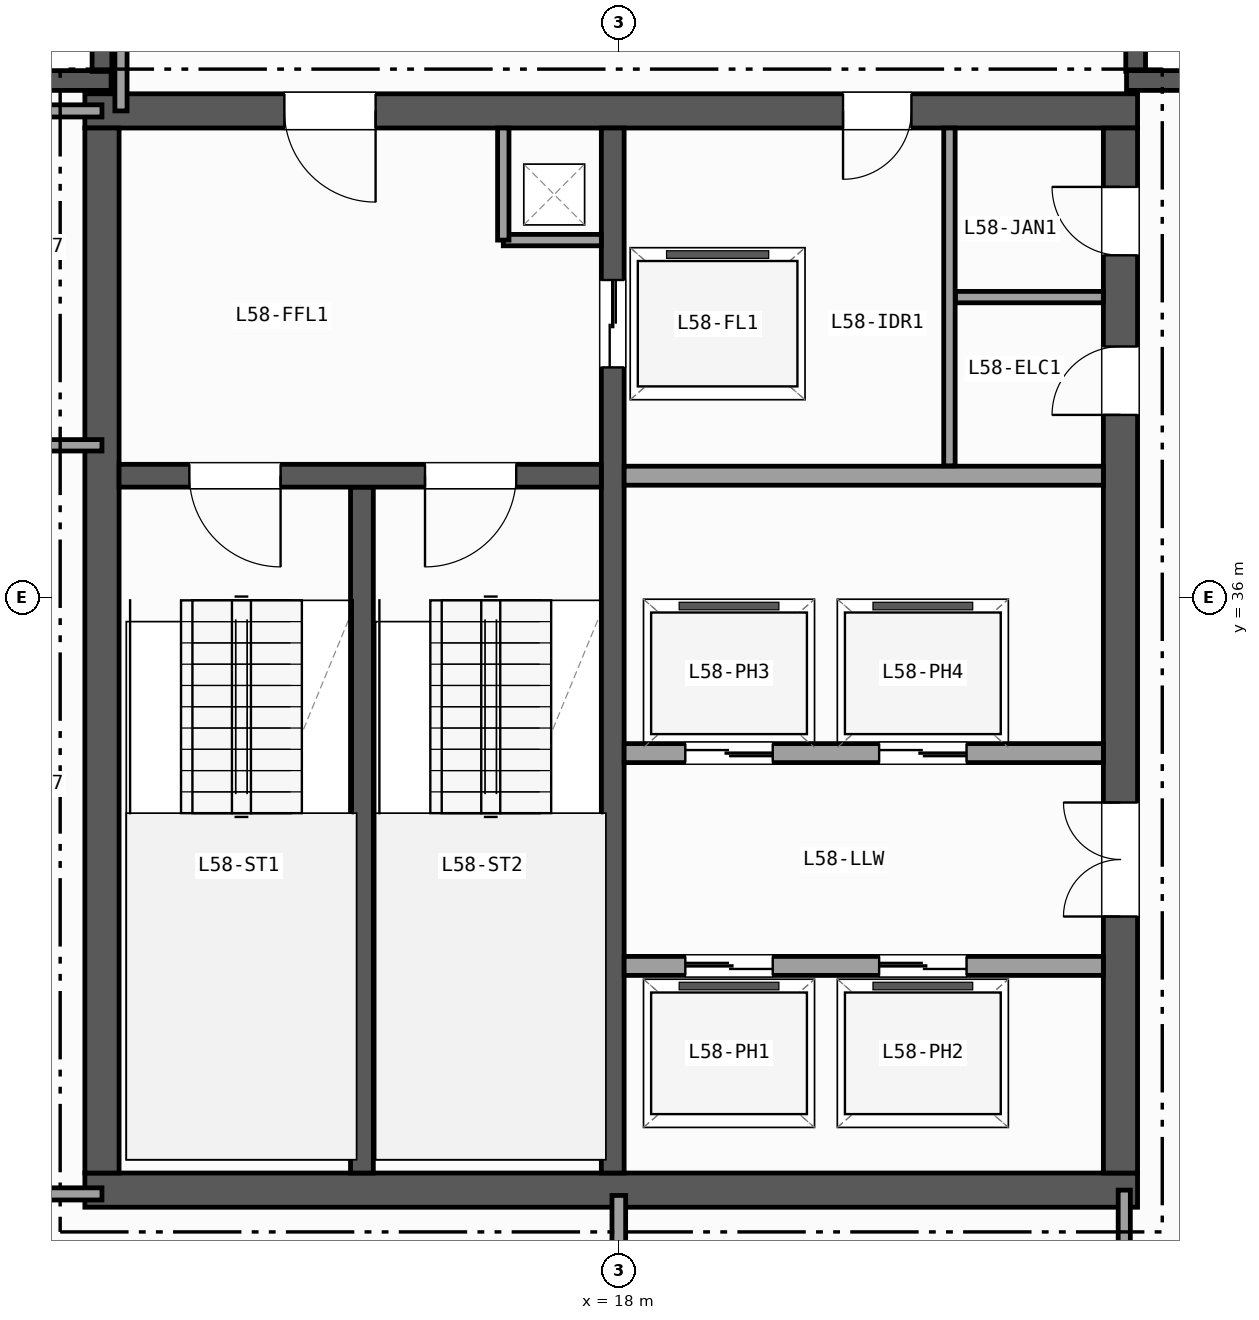
"""IFC4 building model, lengths in metres.
Left out: names, types, materials, properties, quantities, classifications, styles, units other than length and angle.
Written with IfcOpenShell. Run it as: python <this file> out.ifc"""

import sys

from ifc_helpers import new_model, si_unit, direction, frame, frame_2d, origin, place, context, subcontext, project, spatial, rectangle, extrude, element, fill, save


model = new_model("IFC4")
c1 = context("Model", 3, precision=1e-05, world=origin(), true_north=direction((0.0, 1.0)))
c2 = subcontext(c1, "Body", "Model", "MODEL_VIEW")
j1 = project(units=[si_unit("LENGTHUNIT", "METRE"), si_unit("PLANEANGLEUNIT", "RADIAN")], contexts=[c1])
p1 = place(None, origin())
s1 = spatial("IfcSite", under=j1, at=p1, CompositionType="ELEMENT")
p2 = place(p1, origin())
s2 = spatial("IfcBuilding", under=s1, at=p2, CompositionType="ELEMENT")
p3 = place(p2, frame((0.0, 0.0, 232.1)))
s3 = spatial("IfcBuildingStorey", under=s2, at=p3, CompositionType="ELEMENT", Elevation=232.1)
p4 = place(p3, frame((9.0, 42.8, 0.0), z_axis=(0.0, 0.0, 1.0), x_axis=(1.0, 0.0, 0.0)))
e1 = element("IfcWall", 1, at=p4, inside=s3, PredefinedType="SOLIDWALL", context=c2, shape_type="SweptSolid", body=[
    extrude(rectangle(XDim=2.32, YDim=0.26, at=frame_2d((1.16, 0.0))), origin(), (0.0, 0.0, 1.0), 3.37),
])
for number, where, z_axis, x_axis in (
    (2, (11.2, 42.92, 0.0), (0.0, 0.0, 1.0), (0.0, 1.0, 0.0)),
    (3, (24.8, 45.0, 0.0), (0.0, 0.0, 1.0), (0.0, -1.0, 0.0)),
):
    element("IfcWall", number, at=place(p3, frame(where, z_axis=z_axis, x_axis=x_axis)), inside=s3, PredefinedType="SOLIDWALL", context=c2, shape_type="SweptSolid", body=[
        extrude(rectangle(XDim=2.08, YDim=0.26, at=frame_2d((1.04, 0.0))), origin(), (0.0, 0.0, 1.0), 3.37),
    ])
p5 = place(p3, frame((24.68, 42.8, 0.0), z_axis=(0.0, 0.0, 1.0), x_axis=(1.0, 0.0, 0.0)))
e4 = element("IfcWall", 4, at=p5, inside=s3, PredefinedType="SOLIDWALL", context=c2, shape_type="SweptSolid", body=[
    extrude(rectangle(XDim=2.32, YDim=0.26, at=frame_2d((1.16, 0.0))), origin(), (0.0, 0.0, 1.0), 3.37),
])
p6 = place(p3, frame((10.975, 28.2, 0.0), z_axis=(0.0, 0.0, 1.0), x_axis=(1.0, 0.0, 0.0)))
e5 = element("IfcWall", 5, at=p6, inside=s3, PredefinedType="SHEAR", context=c2, shape_type="SweptSolid", body=[
    extrude(rectangle(XDim=13.85, YDim=0.45, at=frame_2d((6.925, 0.0))), origin(), (0.0, 0.0, 1.0), 3.37),
])
p7 = place(p3, frame((24.825, 42.4, 0.0), z_axis=(0.0, 0.0, 1.0), x_axis=(-1.0, 0.0, 0.0)))
e6 = element("IfcWall", 6, at=p7, inside=s3, PredefinedType="SHEAR", context=c2, shape_type="SweptSolid", body=[
    extrude(rectangle(XDim=13.85, YDim=0.45, at=frame_2d((6.925, 0.0))), origin(), (0.0, 0.0, 1.0), 3.37),
])
p8 = place(p7, frame((10.025, 0.0, 0.0)))
e7 = element("IfcOpeningElement", 7, at=p8, cuts=e6, PredefinedType="OPENING", context=c2, shape_type="SweptSolid", body=[
    extrude(rectangle(XDim=1.2, YDim=2.15, at=frame_2d((0.6, 1.075))), frame((0.0, 0.235, 0.0), z_axis=(0.0, -1.0, 0.0), x_axis=(1.0, 0.0, 0.0)), (0.0, 0.0, 1.0), 0.47),
])
p9 = place(p7, frame((2.975, 0.0, 0.0)))
e8 = element("IfcOpeningElement", 8, at=p9, cuts=e6, PredefinedType="OPENING", context=c2, shape_type="SweptSolid", body=[
    extrude(rectangle(XDim=0.9, YDim=2.1, at=frame_2d((0.45, 1.05))), frame((0.0, 0.235, 0.0), z_axis=(0.0, -1.0, 0.0), x_axis=(1.0, 0.0, 0.0)), (0.0, 0.0, 1.0), 0.47),
])
p10 = place(p3, frame((11.2, 42.175, 0.0), z_axis=(0.0, 0.0, 1.0), x_axis=(0.0, -1.0, 0.0)))
e9 = element("IfcWall", 9, at=p10, inside=s3, PredefinedType="SHEAR", context=c2, shape_type="SweptSolid", body=[
    extrude(rectangle(XDim=13.75, YDim=0.45, at=frame_2d((6.875, 0.0))), origin(), (0.0, 0.0, 1.0), 3.37),
])
p11 = place(p3, frame((24.6, 28.425, 0.0), z_axis=(0.0, 0.0, 1.0), x_axis=(0.0, 1.0, 0.0)))
e10 = element("IfcWall", 10, at=p11, inside=s3, PredefinedType="SHEAR", context=c2, shape_type="SweptSolid", body=[
    extrude(rectangle(XDim=13.75, YDim=0.45, at=frame_2d((6.875, 0.0))), origin(), (0.0, 0.0, 1.0), 3.37),
])
p12 = place(p11, frame((3.375, 0.0, 0.0)))
e11 = element("IfcOpeningElement", 11, at=p12, cuts=e10, PredefinedType="OPENING", context=c2, shape_type="SweptSolid", body=[
    extrude(rectangle(XDim=1.5, YDim=2.2, at=frame_2d((0.75, 1.1))), frame((0.0, 0.235, 0.0), z_axis=(0.0, -1.0, 0.0), x_axis=(1.0, 0.0, 0.0)), (0.0, 0.0, 1.0), 0.47),
])
p13 = place(p11, frame((9.975, 0.0, 0.0)))
e12 = element("IfcOpeningElement", 12, at=p13, cuts=e10, PredefinedType="OPENING", context=c2, shape_type="SweptSolid", body=[
    extrude(rectangle(XDim=0.9, YDim=2.1, at=frame_2d((0.45, 1.05))), frame((0.0, 0.235, 0.0), z_axis=(0.0, -1.0, 0.0), x_axis=(1.0, 0.0, 0.0)), (0.0, 0.0, 1.0), 0.47),
])
p14 = place(p11, frame((12.075, 0.0, 0.0)))
e13 = element("IfcOpeningElement", 13, at=p14, cuts=e10, PredefinedType="OPENING", context=c2, shape_type="SweptSolid", body=[
    extrude(rectangle(XDim=0.9, YDim=2.1, at=frame_2d((0.45, 1.05))), frame((0.0, 0.235, 0.0), z_axis=(0.0, -1.0, 0.0), x_axis=(1.0, 0.0, 0.0)), (0.0, 0.0, 1.0), 0.47),
])
p15 = place(p3, frame((14.62, 28.425, 0.0), z_axis=(0.0, 0.0, 1.0), x_axis=(0.0, 1.0, 0.0)))
e14 = element("IfcWall", 14, at=p15, inside=s3, PredefinedType="SHEAR", context=c2, shape_type="SweptSolid", body=[
    extrude(rectangle(XDim=9.025, YDim=0.3, at=frame_2d((4.512, 0.0))), origin(), (0.0, 0.0, 1.0), 3.37),
])
p16 = place(p3, frame((17.92, 42.175, 0.0), z_axis=(0.0, 0.0, 1.0), x_axis=(0.0, -1.0, 0.0)))
e15 = element("IfcWall", 15, at=p16, inside=s3, PredefinedType="SHEAR", context=c2, shape_type="SweptSolid", body=[
    extrude(rectangle(XDim=13.75, YDim=0.3, at=frame_2d((6.875, 0.0))), origin(), (0.0, 0.0, 1.0), 3.37),
])
p17 = place(p16, frame((2.0, 0.0, 0.0)))
e16 = element("IfcOpeningElement", 16, at=p17, cuts=e15, PredefinedType="OPENING", context=c2, shape_type="SweptSolid", body=[
    extrude(rectangle(XDim=1.15, YDim=2.15, at=frame_2d((0.575, 1.075))), frame((0.0, 0.16, 0.0), z_axis=(0.0, -1.0, 0.0), x_axis=(1.0, 0.0, 0.0)), (0.0, 0.0, 1.0), 0.32),
])
p18 = place(p3, frame((17.77, 37.6, 0.0), z_axis=(0.0, 0.0, 1.0), x_axis=(-1.0, 0.0, 0.0)))
e17 = element("IfcWall", 17, at=p18, inside=s3, PredefinedType="SHEAR", context=c2, shape_type="SweptSolid", body=[
    extrude(rectangle(XDim=6.345, YDim=0.3, at=frame_2d((3.172, 0.0))), origin(), (0.0, 0.0, 1.0), 3.37),
])
p19 = place(p18, frame((4.22, 0.0, 0.0)))
e18 = element("IfcOpeningElement", 18, at=p19, cuts=e17, PredefinedType="OPENING", context=c2, shape_type="SweptSolid", body=[
    extrude(rectangle(XDim=1.2, YDim=2.15, at=frame_2d((0.6, 1.075))), frame((0.0, 0.16, 0.0), z_axis=(0.0, -1.0, 0.0), x_axis=(1.0, 0.0, 0.0)), (0.0, 0.0, 1.0), 0.32),
])
p20 = place(p18, frame((1.12, 0.0, 0.0)))
e19 = element("IfcOpeningElement", 19, at=p20, cuts=e17, PredefinedType="OPENING", context=c2, shape_type="SweptSolid", body=[
    extrude(rectangle(XDim=1.2, YDim=2.15, at=frame_2d((0.6, 1.075))), frame((0.0, 0.16, 0.0), z_axis=(0.0, -1.0, 0.0), x_axis=(1.0, 0.0, 0.0)), (0.0, 0.0, 1.0), 0.32),
])
p21 = place(p3, frame((16.48, 40.7, 0.0), z_axis=(0.0, 0.0, 1.0), x_axis=(1.0, 0.0, 0.0)))
e20 = element("IfcWall", 20, at=p21, inside=s3, PredefinedType="PARTITIONING", context=c2, shape_type="SweptSolid", body=[
    extrude(rectangle(XDim=1.29, YDim=0.15, at=frame_2d((0.645, 0.0))), origin(), (0.0, 0.0, 1.0), 3.37),
])
p22 = place(p3, frame((16.48, 40.7, 0.0), z_axis=(0.0, 0.0, 1.0), x_axis=(0.0, 1.0, 0.0)))
e21 = element("IfcWall", 21, at=p22, inside=s3, PredefinedType="PARTITIONING", context=c2, shape_type="SweptSolid", body=[
    extrude(rectangle(XDim=1.475, YDim=0.15, at=frame_2d((0.738, 0.0))), origin(), (0.0, 0.0, 1.0), 3.37),
])
p23 = place(p3, frame((18.07, 37.6, 0.0), z_axis=(0.0, 0.0, 1.0), x_axis=(1.0, 0.0, 0.0)))
e22 = element("IfcWall", 22, at=p23, inside=s3, PredefinedType="PARTITIONING", context=c2, shape_type="SweptSolid", body=[
    extrude(rectangle(XDim=6.305, YDim=0.25, at=frame_2d((3.152, 0.0))), origin(), (0.0, 0.0, 1.0), 3.37),
])
p24 = place(p3, frame((18.07, 31.15, 0.0), z_axis=(0.0, 0.0, 1.0), x_axis=(1.0, 0.0, 0.0)))
e23 = element("IfcWall", 23, at=p24, inside=s3, PredefinedType="PARTITIONING", context=c2, shape_type="SweptSolid", body=[
    extrude(rectangle(XDim=6.305, YDim=0.25, at=frame_2d((3.152, 0.0))), origin(), (0.0, 0.0, 1.0), 3.37),
])
p25 = place(p24, frame((0.805, 0.0, 0.0)))
e24 = element("IfcOpeningElement", 24, at=p25, cuts=e23, PredefinedType="OPENING", context=c2, shape_type="SweptSolid", body=[
    extrude(rectangle(XDim=1.15, YDim=2.15, at=frame_2d((0.575, 1.075))), frame((0.0, 0.135, 0.0), z_axis=(0.0, -1.0, 0.0), x_axis=(1.0, 0.0, 0.0)), (0.0, 0.0, 1.0), 0.27),
])
p26 = place(p24, frame((3.355, 0.0, 0.0)))
e25 = element("IfcOpeningElement", 25, at=p26, cuts=e23, PredefinedType="OPENING", context=c2, shape_type="SweptSolid", body=[
    extrude(rectangle(XDim=1.15, YDim=2.15, at=frame_2d((0.575, 1.075))), frame((0.0, 0.135, 0.0), z_axis=(0.0, -1.0, 0.0), x_axis=(1.0, 0.0, 0.0)), (0.0, 0.0, 1.0), 0.27),
])
p27 = place(p3, frame((24.375, 33.95, 0.0), z_axis=(0.0, 0.0, 1.0), x_axis=(-1.0, 0.0, 0.0)))
e26 = element("IfcWall", 26, at=p27, inside=s3, PredefinedType="PARTITIONING", context=c2, shape_type="SweptSolid", body=[
    extrude(rectangle(XDim=6.305, YDim=0.25, at=frame_2d((3.152, 0.0))), origin(), (0.0, 0.0, 1.0), 3.37),
])
p28 = place(p27, frame((4.35, 0.0, 0.0)))
e27 = element("IfcOpeningElement", 27, at=p28, cuts=e26, PredefinedType="OPENING", context=c2, shape_type="SweptSolid", body=[
    extrude(rectangle(XDim=1.15, YDim=2.15, at=frame_2d((0.575, 1.075))), frame((0.0, 0.135, 0.0), z_axis=(0.0, -1.0, 0.0), x_axis=(1.0, 0.0, 0.0)), (0.0, 0.0, 1.0), 0.27),
])
p29 = place(p27, frame((1.8, 0.0, 0.0)))
e28 = element("IfcOpeningElement", 28, at=p29, cuts=e26, PredefinedType="OPENING", context=c2, shape_type="SweptSolid", body=[
    extrude(rectangle(XDim=1.15, YDim=2.15, at=frame_2d((0.575, 1.075))), frame((0.0, 0.135, 0.0), z_axis=(0.0, -1.0, 0.0), x_axis=(1.0, 0.0, 0.0)), (0.0, 0.0, 1.0), 0.27),
])
p30 = place(p3, frame((22.35, 37.73, 0.0), z_axis=(0.0, 0.0, 1.0), x_axis=(0.0, 1.0, 0.0)))
e29 = element("IfcWall", 29, at=p30, inside=s3, PredefinedType="PARTITIONING", context=c2, shape_type="SweptSolid", body=[
    extrude(rectangle(XDim=4.445, YDim=0.15, at=frame_2d((2.223, 0.0))), origin(), (0.0, 0.0, 1.0), 3.37),
])
p31 = place(p3, frame((22.43, 39.95, 0.0), z_axis=(0.0, 0.0, 1.0), x_axis=(1.0, 0.0, 0.0)))
e30 = element("IfcWall", 30, at=p31, inside=s3, PredefinedType="PARTITIONING", context=c2, shape_type="SweptSolid", body=[
    extrude(rectangle(XDim=1.945, YDim=0.15, at=frame_2d((0.973, 0.0))), origin(), (0.0, 0.0, 1.0), 3.37),
])
p32 = place(p3, frame((9.0, 28.15, 0.0), z_axis=(0.0, 0.0, 1.0), x_axis=(1.0, 0.0, 0.0)))
e31 = element("IfcWall", 31, at=p32, inside=s3, PredefinedType="PARTITIONING", context=c2, shape_type="SweptSolid", body=[
    extrude(rectangle(XDim=2.2, YDim=0.16, at=frame_2d((1.1, 0.0))), origin(), (0.0, 0.0, 1.0), 2.657),
])
p33 = place(p32, frame((0.45, 0.0, 0.0)))
e32 = element("IfcOpeningElement", 32, at=p33, cuts=e31, PredefinedType="OPENING", context=c2, shape_type="SweptSolid", body=[
    extrude(rectangle(XDim=1.0, YDim=2.1, at=frame_2d((0.5, 1.05))), frame((0.0, 0.09, 0.0), z_axis=(0.0, -1.0, 0.0), x_axis=(1.0, 0.0, 0.0)), (0.0, 0.0, 1.0), 0.18),
])
p34 = place(p3, frame((9.0, 42.4, 0.0), z_axis=(0.0, 0.0, 1.0), x_axis=(1.0, 0.0, 0.0)))
e33 = element("IfcWall", 33, at=p34, inside=s3, PredefinedType="PARTITIONING", context=c2, shape_type="SweptSolid", body=[
    extrude(rectangle(XDim=2.2, YDim=0.16, at=frame_2d((1.1, 0.0))), origin(), (0.0, 0.0, 1.0), 3.37),
])
p35 = place(p3, frame((11.45, 42.4, 0.0), z_axis=(0.0, 0.0, 1.0), x_axis=(0.0, 1.0, 0.0)))
e34 = element("IfcWall", 34, at=p35, inside=s3, PredefinedType="PARTITIONING", context=c2, shape_type="SweptSolid", body=[
    extrude(rectangle(XDim=2.666, YDim=0.16, at=frame_2d((1.333, 0.0))), origin(), (0.0, 0.0, 1.0), 3.37),
])
p36 = place(p3, frame((9.0, 38.0, 0.0), z_axis=(0.0, 0.0, 1.0), x_axis=(1.0, 0.0, 0.0)))
e35 = element("IfcWall", 35, at=p36, inside=s3, PredefinedType="PARTITIONING", context=c2, shape_type="SweptSolid", body=[
    extrude(rectangle(XDim=2.2, YDim=0.15, at=frame_2d((1.1, 0.0))), origin(), (0.0, 0.0, 1.0), 3.37),
])
p37 = place(p36, frame((0.45, 0.0, 0.0)))
e36 = element("IfcOpeningElement", 36, at=p37, cuts=e35, PredefinedType="OPENING", context=c2, shape_type="SweptSolid", body=[
    extrude(rectangle(XDim=0.9, YDim=2.1, at=frame_2d((0.45, 1.05))), frame((0.0, 0.085, 0.0), z_axis=(0.0, -1.0, 0.0), x_axis=(1.0, 0.0, 0.0)), (0.0, 0.0, 1.0), 0.17),
])
p38 = place(p3, frame((24.65, 9.0, 0.0), z_axis=(0.0, 0.0, 1.0), x_axis=(0.0, 1.0, 0.0)))
e37 = element("IfcWall", 37, at=p38, inside=s3, PredefinedType="PARTITIONING", context=c2, shape_type="SweptSolid", body=[
    extrude(rectangle(XDim=19.2, YDim=0.16, at=frame_2d((9.6, 0.0))), origin(), (0.0, 0.0, 1.0), 2.657),
])
p39 = place(p38, frame((3.2, 0.0, 0.0)))
e38 = element("IfcOpeningElement", 38, at=p39, cuts=e37, PredefinedType="OPENING", context=c2, shape_type="SweptSolid", body=[
    extrude(rectangle(XDim=1.2, YDim=2.15, at=frame_2d((0.6, 1.075))), frame((0.0, 0.09, 0.0), z_axis=(0.0, -1.0, 0.0), x_axis=(1.0, 0.0, 0.0)), (0.0, 0.0, 1.0), 0.18),
])
p40 = place(p38, frame((12.765, 0.0, 0.0)))
e39 = element("IfcOpeningElement", 39, at=p40, cuts=e37, PredefinedType="OPENING", context=c2, shape_type="SweptSolid", body=[
    extrude(rectangle(XDim=0.86, YDim=2.05, at=frame_2d((0.43, 1.025))), frame((0.0, 0.09, 0.0), z_axis=(0.0, -1.0, 0.0), x_axis=(1.0, 0.0, 0.0)), (0.0, 0.0, 1.0), 0.18),
])
p41 = place(p3, frame((18.0, 9.0, 0.0), z_axis=(0.0, 0.0, 1.0), x_axis=(0.0, 1.0, 0.0)))
e40 = element("IfcWall", 40, at=p41, inside=s3, PredefinedType="PARTITIONING", context=c2, shape_type="SweptSolid", body=[
    extrude(rectangle(XDim=19.13, YDim=0.18, at=frame_2d((9.565, 0.0))), origin(), (0.0, 0.0, 1.0), 2.657),
])
p42 = place(p41, frame((2.2, 0.0, 0.0)))
e41 = element("IfcOpeningElement", 41, at=p42, cuts=e40, PredefinedType="OPENING", context=c2, shape_type="SweptSolid", body=[
    extrude(rectangle(XDim=0.95, YDim=2.1, at=frame_2d((0.475, 1.05))), frame((0.0, 0.1, 0.0), z_axis=(0.0, -1.0, 0.0), x_axis=(1.0, 0.0, 0.0)), (0.0, 0.0, 1.0), 0.2),
])
p43 = place(p41, frame((13.5, 0.0, 0.0)))
e42 = element("IfcOpeningElement", 42, at=p43, cuts=e40, PredefinedType="OPENING", context=c2, shape_type="SweptSolid", body=[
    extrude(rectangle(XDim=1.0, YDim=2.1, at=frame_2d((0.5, 1.05))), frame((0.0, 0.1, 0.0), z_axis=(0.0, -1.0, 0.0), x_axis=(1.0, 0.0, 0.0)), (0.0, 0.0, 1.0), 0.2),
])
p44 = place(p19, origin())
e43 = element("IfcDoor", 43, at=p44, inside=s3, OperationType="SINGLE_SWING_LEFT", PredefinedType="DOOR", context=c2, shape_type="SweptSolid", body=[
    extrude(rectangle(XDim=1.2, YDim=2.15, at=frame_2d((0.6, 1.075))), frame((0.0, 0.025, 0.0), z_axis=(0.0, -1.0, 0.0), x_axis=(1.0, 0.0, 0.0)), (0.0, 0.0, 1.0), 0.05),
])
fill(e18, e43)
p45 = place(p20, origin())
e44 = element("IfcDoor", 44, at=p45, inside=s3, OperationType="SINGLE_SWING_RIGHT", PredefinedType="DOOR", context=c2, shape_type="SweptSolid", body=[
    extrude(rectangle(XDim=1.2, YDim=2.15, at=frame_2d((0.6, 1.075))), frame((0.0, 0.025, 0.0), z_axis=(0.0, -1.0, 0.0), x_axis=(1.0, 0.0, 0.0)), (0.0, 0.0, 1.0), 0.05),
])
fill(e19, e44)
p46 = place(p12, origin())
e45 = element("IfcDoor", 45, at=p46, inside=s3, OperationType="DOUBLE_DOOR_SINGLE_SWING", PredefinedType="DOOR", context=c2, shape_type="SweptSolid", body=[
    extrude(rectangle(XDim=1.5, YDim=2.2, at=frame_2d((0.75, 1.1))), frame((0.0, 0.025, 0.0), z_axis=(0.0, -1.0, 0.0), x_axis=(1.0, 0.0, 0.0)), (0.0, 0.0, 1.0), 0.05),
])
fill(e11, e45)
p47 = place(p8, origin())
e46 = element("IfcDoor", 46, at=p47, inside=s3, OperationType="SINGLE_SWING_LEFT", PredefinedType="DOOR", context=c2, shape_type="SweptSolid", body=[
    extrude(rectangle(XDim=1.2, YDim=2.15, at=frame_2d((0.6, 1.075))), frame((0.0, 0.025, 0.0), z_axis=(0.0, -1.0, 0.0), x_axis=(1.0, 0.0, 0.0)), (0.0, 0.0, 1.0), 0.05),
])
fill(e7, e46)
p48 = place(p13, origin())
e47 = element("IfcDoor", 47, at=p48, inside=s3, OperationType="SINGLE_SWING_LEFT", PredefinedType="DOOR", context=c2, shape_type="SweptSolid", body=[
    extrude(rectangle(XDim=0.9, YDim=2.1, at=frame_2d((0.45, 1.05))), frame((0.0, 0.025, 0.0), z_axis=(0.0, -1.0, 0.0), x_axis=(1.0, 0.0, 0.0)), (0.0, 0.0, 1.0), 0.05),
])
fill(e12, e47)
p49 = place(p9, origin())
e48 = element("IfcDoor", 48, at=p49, inside=s3, OperationType="SINGLE_SWING_RIGHT", PredefinedType="DOOR", context=c2, shape_type="SweptSolid", body=[
    extrude(rectangle(XDim=0.9, YDim=2.1, at=frame_2d((0.45, 1.05))), frame((0.0, 0.025, 0.0), z_axis=(0.0, -1.0, 0.0), x_axis=(1.0, 0.0, 0.0)), (0.0, 0.0, 1.0), 0.05),
])
fill(e8, e48)
p50 = place(p14, origin())
e49 = element("IfcDoor", 49, at=p50, inside=s3, OperationType="SINGLE_SWING_RIGHT", PredefinedType="DOOR", context=c2, shape_type="SweptSolid", body=[
    extrude(rectangle(XDim=0.9, YDim=2.1, at=frame_2d((0.45, 1.05))), frame((0.0, 0.025, 0.0), z_axis=(0.0, -1.0, 0.0), x_axis=(1.0, 0.0, 0.0)), (0.0, 0.0, 1.0), 0.05),
])
fill(e13, e49)
p51 = place(p17, origin())
e50 = element("IfcDoor", 50, at=p51, inside=s3, OperationType="DOUBLE_DOOR_SLIDING", PredefinedType="DOOR", context=c2, shape_type="SweptSolid", body=[
    extrude(rectangle(XDim=1.15, YDim=2.15, at=frame_2d((0.575, 1.075))), frame((0.0, 0.025, 0.0), z_axis=(0.0, -1.0, 0.0), x_axis=(1.0, 0.0, 0.0)), (0.0, 0.0, 1.0), 0.05),
])
fill(e16, e50)
p52 = place(p25, origin())
e51 = element("IfcDoor", 51, at=p52, inside=s3, OperationType="DOUBLE_DOOR_SLIDING", PredefinedType="DOOR", context=c2, shape_type="SweptSolid", body=[
    extrude(rectangle(XDim=1.15, YDim=2.15, at=frame_2d((0.575, 1.075))), frame((0.0, 0.025, 0.0), z_axis=(0.0, -1.0, 0.0), x_axis=(1.0, 0.0, 0.0)), (0.0, 0.0, 1.0), 0.05),
])
fill(e24, e51)
p53 = place(p26, origin())
e52 = element("IfcDoor", 52, at=p53, inside=s3, OperationType="DOUBLE_DOOR_SLIDING", PredefinedType="DOOR", context=c2, shape_type="SweptSolid", body=[
    extrude(rectangle(XDim=1.15, YDim=2.15, at=frame_2d((0.575, 1.075))), frame((0.0, 0.025, 0.0), z_axis=(0.0, -1.0, 0.0), x_axis=(1.0, 0.0, 0.0)), (0.0, 0.0, 1.0), 0.05),
])
fill(e25, e52)
p54 = place(p28, origin())
e53 = element("IfcDoor", 53, at=p54, inside=s3, OperationType="DOUBLE_DOOR_SLIDING", PredefinedType="DOOR", context=c2, shape_type="SweptSolid", body=[
    extrude(rectangle(XDim=1.15, YDim=2.15, at=frame_2d((0.575, 1.075))), frame((0.0, 0.025, 0.0), z_axis=(0.0, -1.0, 0.0), x_axis=(1.0, 0.0, 0.0)), (0.0, 0.0, 1.0), 0.05),
])
fill(e27, e53)
p55 = place(p29, origin())
e54 = element("IfcDoor", 54, at=p55, inside=s3, OperationType="DOUBLE_DOOR_SLIDING", PredefinedType="DOOR", context=c2, shape_type="SweptSolid", body=[
    extrude(rectangle(XDim=1.15, YDim=2.15, at=frame_2d((0.575, 1.075))), frame((0.0, 0.025, 0.0), z_axis=(0.0, -1.0, 0.0), x_axis=(1.0, 0.0, 0.0)), (0.0, 0.0, 1.0), 0.05),
])
fill(e28, e54)
save(model, sys.argv[1])
